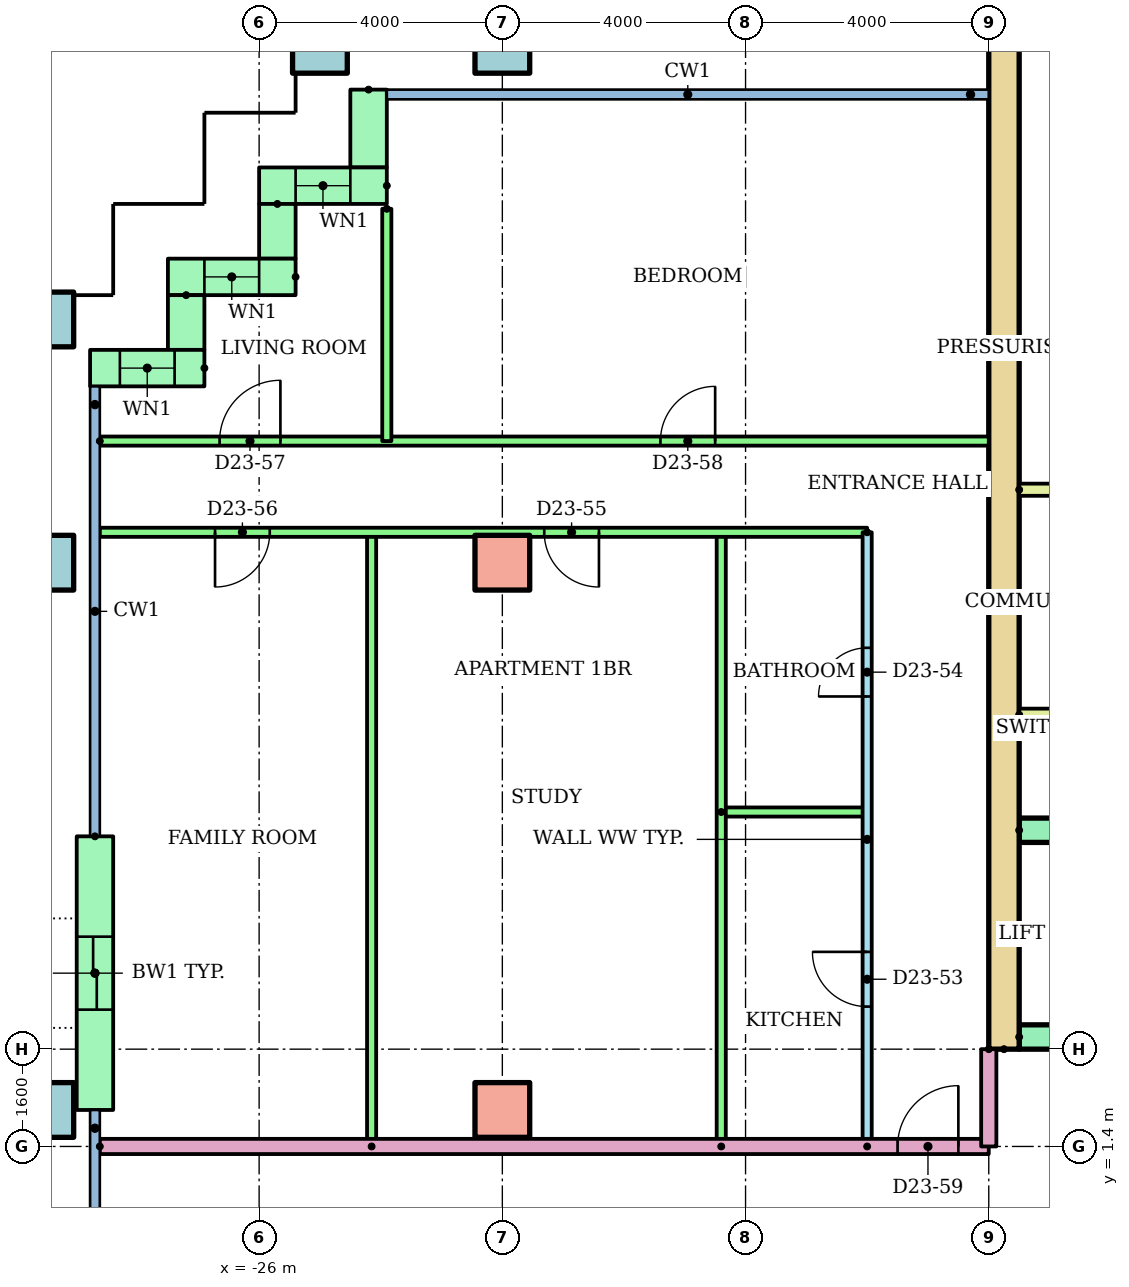
"""IFC4 building model, lengths in metres.
Left out: names, types, materials, properties, quantities, classifications, styles, units other than length and angle.
Written with IfcOpenShell. Run it as: python <this file> out.ifc"""

import sys

from ifc_helpers import new_model, si_unit, direction, frame, frame_2d, origin, origin_2d, place, context, subcontext, project, spatial, rectangle, hollow_rectangle, extrude, element, fill, save


model = new_model("IFC4")
c1 = context("Model", 3, precision=1e-05, world=origin(), true_north=direction((0.0, 1.0)))
c2 = subcontext(c1, "Body", "Model", "MODEL_VIEW")
j1 = project(units=[si_unit("LENGTHUNIT", "METRE"), si_unit("PLANEANGLEUNIT", "RADIAN")], contexts=[c1])
p1 = place(None, origin())
s1 = spatial("IfcSite", under=j1, at=p1, CompositionType="ELEMENT")
p2 = place(p1, origin())
s2 = spatial("IfcBuilding", under=s1, at=p2, CompositionType="ELEMENT")
p3 = place(p2, frame((0.0, 0.0, 90.3)))
s3 = spatial("IfcBuildingStorey", under=s2, at=p3, CompositionType="ELEMENT", Elevation=90.3)
p4 = place(p3, frame((-29.5, 2.0, 0.0)))
e1 = element("IfcColumn", 1, at=p4, inside=s3, PredefinedType="COLUMN", context=c2, shape_type="SweptSolid", body=[
    extrude(hollow_rectangle(XDim=0.9, YDim=0.9, WallThickness=0.045, at=origin_2d()), origin(), (0.0, 0.0, 1.0), 3.2),
])
p5 = place(p3, frame((-22.0, 2.0, 0.0)))
e2 = element("IfcColumn", 2, at=p5, inside=s3, PredefinedType="COLUMN", context=c2, shape_type="SweptSolid", body=[
    extrude(rectangle(XDim=0.9, YDim=0.9, at=origin_2d()), origin(), (0.0, 0.0, 1.0), 3.2),
])
p6 = place(p3, frame((-29.5, 11.0, 0.0)))
e3 = element("IfcColumn", 3, at=p6, inside=s3, PredefinedType="COLUMN", context=c2, shape_type="SweptSolid", body=[
    extrude(hollow_rectangle(XDim=0.9, YDim=0.9, WallThickness=0.045, at=origin_2d()), origin(), (0.0, 0.0, 1.0), 3.2),
])
p7 = place(p3, frame((-22.0, 11.0, 0.0)))
e4 = element("IfcColumn", 4, at=p7, inside=s3, PredefinedType="COLUMN", context=c2, shape_type="SweptSolid", body=[
    extrude(rectangle(XDim=0.9, YDim=0.9, at=origin_2d()), origin(), (0.0, 0.0, 1.0), 3.2),
])
for number, where in (
    (5, (-29.5, 15.0, 0.0)),
    (6, (-25.0, 19.5, 0.0)),
    (7, (-22.0, 19.5, 0.0)),
):
    element("IfcColumn", number, at=place(p3, frame(where)), inside=s3, PredefinedType="COLUMN", context=c2, shape_type="SweptSolid", body=[
        extrude(hollow_rectangle(XDim=0.9, YDim=0.9, WallThickness=0.045, at=origin_2d()), origin(), (0.0, 0.0, 1.0), 3.2),
    ])
p8 = place(p3, frame((-24.2, 18.78, 0.0), z_axis=(0.0, 0.0, 1.0), x_axis=(0.0, -1.0, 0.0)))
e8 = element("IfcWall", 8, at=p8, inside=s3, PredefinedType="STANDARD", context=c2, shape_type="SweptSolid", body=[
    extrude(rectangle(XDim=1.28, YDim=0.6, at=frame_2d((0.64, 0.0))), origin(), (0.0, 0.0, 1.0), 2.92),
])
p9 = place(p3, frame((-23.9, 17.2, 0.0), z_axis=(0.0, 0.0, 1.0), x_axis=(-1.0, 0.0, 0.0)))
e9 = element("IfcWall", 9, at=p9, inside=s3, PredefinedType="STANDARD", context=c2, shape_type="SweptSolid", body=[
    extrude(rectangle(XDim=2.1, YDim=0.6, at=frame_2d((1.05, 0.0))), origin(), (0.0, 0.0, 1.0), 2.92),
])
p10 = place(p9, frame((0.6, 0.0, 0.9)))
e10 = element("IfcOpeningElement", 10, at=p10, cuts=e9, PredefinedType="OPENING", context=c2, shape_type="SweptSolid", body=[
    extrude(rectangle(XDim=0.9, YDim=1.5, at=frame_2d((0.45, 0.75))), frame((0.0, 0.31, 0.0), z_axis=(0.0, -1.0, 0.0), x_axis=(1.0, 0.0, 0.0)), (0.0, 0.0, 1.0), 0.62),
])
p11 = place(p3, frame((-25.7, 16.9, 0.0), z_axis=(0.0, 0.0, 1.0), x_axis=(0.0, -1.0, 0.0)))
e11 = element("IfcWall", 11, at=p11, inside=s3, PredefinedType="STANDARD", context=c2, shape_type="SweptSolid", body=[
    extrude(rectangle(XDim=0.9, YDim=0.6, at=frame_2d((0.45, 0.0))), origin(), (0.0, 0.0, 1.0), 2.92),
])
p12 = place(p3, frame((-25.4, 15.7, 0.0), z_axis=(0.0, 0.0, 1.0), x_axis=(-1.0, 0.0, 0.0)))
e12 = element("IfcWall", 12, at=p12, inside=s3, PredefinedType="STANDARD", context=c2, shape_type="SweptSolid", body=[
    extrude(rectangle(XDim=2.1, YDim=0.6, at=frame_2d((1.05, 0.0))), origin(), (0.0, 0.0, 1.0), 2.92),
])
p13 = place(p12, frame((0.6, 0.0, 0.9)))
e13 = element("IfcOpeningElement", 13, at=p13, cuts=e12, PredefinedType="OPENING", context=c2, shape_type="SweptSolid", body=[
    extrude(rectangle(XDim=0.9, YDim=1.5, at=frame_2d((0.45, 0.75))), frame((0.0, 0.31, 0.0), z_axis=(0.0, -1.0, 0.0), x_axis=(1.0, 0.0, 0.0)), (0.0, 0.0, 1.0), 0.62),
])
p14 = place(p3, frame((-27.2, 15.4, 0.0), z_axis=(0.0, 0.0, 1.0), x_axis=(0.0, -1.0, 0.0)))
e14 = element("IfcWall", 14, at=p14, inside=s3, PredefinedType="STANDARD", context=c2, shape_type="SweptSolid", body=[
    extrude(rectangle(XDim=0.9, YDim=0.6, at=frame_2d((0.45, 0.0))), origin(), (0.0, 0.0, 1.0), 2.92),
])
p15 = place(p3, frame((-26.9, 14.2, 0.0), z_axis=(0.0, 0.0, 1.0), x_axis=(-1.0, 0.0, 0.0)))
e15 = element("IfcWall", 15, at=p15, inside=s3, PredefinedType="STANDARD", context=c2, shape_type="SweptSolid", body=[
    extrude(rectangle(XDim=1.88, YDim=0.6, at=frame_2d((0.94, 0.0))), origin(), (0.0, 0.0, 1.0), 2.92),
])
p16 = place(p15, frame((0.49, 0.0, 0.9)))
e16 = element("IfcOpeningElement", 16, at=p16, cuts=e15, PredefinedType="OPENING", context=c2, shape_type="SweptSolid", body=[
    extrude(rectangle(XDim=0.9, YDim=1.5, at=frame_2d((0.45, 0.75))), frame((0.0, 0.31, 0.0), z_axis=(0.0, -1.0, 0.0), x_axis=(1.0, 0.0, 0.0)), (0.0, 0.0, 1.0), 0.62),
])
p17 = place(p3, frame((-28.7, 6.5, 0.0), z_axis=(0.0, 0.0, 1.0), x_axis=(0.0, -1.0, 0.0)))
e17 = element("IfcWall", 17, at=p17, inside=s3, PredefinedType="STANDARD", context=c2, shape_type="SweptSolid", body=[
    extrude(rectangle(XDim=4.5, YDim=0.6, at=frame_2d((2.25, 0.0))), origin(), (0.0, 0.0, 1.0), 2.92),
])
p18 = place(p17, frame((1.65, 0.0, 0.0)))
e18 = element("IfcOpeningElement", 18, at=p18, cuts=e17, PredefinedType="OPENING", context=c2, shape_type="SweptSolid", body=[
    extrude(rectangle(XDim=1.2, YDim=2.1, at=frame_2d((0.6, 1.05))), frame((0.0, 0.31, 0.0), z_axis=(0.0, -1.0, 0.0), x_axis=(1.0, 0.0, 0.0)), (0.0, 0.0, 1.0), 0.62),
])
p19 = place(p3, frame((-13.75, 3.0, 0.0), z_axis=(0.0, 0.0, 1.0), x_axis=(0.0, 1.0, 0.0)))
e19 = element("IfcWall", 19, at=p19, inside=s3, PredefinedType="SHEAR", context=c2, shape_type="SweptSolid", body=[
    extrude(rectangle(XDim=17.0, YDim=0.5, at=frame_2d((8.5, 0.0))), origin(), (0.0, 0.0, 1.0), 2.92),
])
p20 = place(p3, frame((-13.5, 3.2, 0.0)))
e20 = element("IfcWall", 20, at=p20, inside=s3, PredefinedType="SHEAR", context=c2, shape_type="SweptSolid", body=[
    extrude(rectangle(XDim=27.0, YDim=0.4, at=frame_2d((13.5, 0.0))), origin(), (0.0, 0.0, 1.0), 2.92),
])
p21 = place(p20, frame((6.861, 0.0, 0.0)))
e21 = element("IfcOpeningElement", 21, at=p21, cuts=e20, PredefinedType="OPENING", context=c2, shape_type="SweptSolid", body=[
    extrude(rectangle(XDim=1.1, YDim=2.1, at=frame_2d((0.55, 1.05))), frame((0.0, 0.21, 0.0), z_axis=(0.0, -1.0, 0.0), x_axis=(1.0, 0.0, 0.0)), (0.0, 0.0, 1.0), 0.42),
])
p22 = place(p20, frame((9.906, 0.0, 0.0)))
e22 = element("IfcOpeningElement", 22, at=p22, cuts=e20, PredefinedType="OPENING", context=c2, shape_type="SweptSolid", body=[
    extrude(rectangle(XDim=1.1, YDim=2.1, at=frame_2d((0.55, 1.05))), frame((0.0, 0.21, 0.0), z_axis=(0.0, -1.0, 0.0), x_axis=(1.0, 0.0, 0.0)), (0.0, 0.0, 1.0), 0.42),
])
p23 = place(p20, frame((15.994, 0.0, 0.0)))
e23 = element("IfcOpeningElement", 23, at=p23, cuts=e20, PredefinedType="OPENING", context=c2, shape_type="SweptSolid", body=[
    extrude(rectangle(XDim=1.1, YDim=2.1, at=frame_2d((0.55, 1.05))), frame((0.0, 0.21, 0.0), z_axis=(0.0, -1.0, 0.0), x_axis=(1.0, 0.0, 0.0)), (0.0, 0.0, 1.0), 0.42),
])
p24 = place(p20, frame((19.039, 0.0, 0.0)))
e24 = element("IfcOpeningElement", 24, at=p24, cuts=e20, PredefinedType="OPENING", context=c2, shape_type="SweptSolid", body=[
    extrude(rectangle(XDim=1.1, YDim=2.1, at=frame_2d((0.55, 1.05))), frame((0.0, 0.21, 0.0), z_axis=(0.0, -1.0, 0.0), x_axis=(1.0, 0.0, 0.0)), (0.0, 0.0, 1.0), 0.42),
])
p25 = place(p20, frame((12.6, 0.0, 0.0)))
e25 = element("IfcOpeningElement", 25, at=p25, cuts=e20, PredefinedType="OPENING", context=c2, shape_type="SweptSolid", body=[
    extrude(rectangle(XDim=1.8, YDim=2.1, at=frame_2d((0.9, 1.05))), frame((0.0, 0.21, 0.0), z_axis=(0.0, -1.0, 0.0), x_axis=(1.0, 0.0, 0.0)), (0.0, 0.0, 1.0), 0.42),
])
p26 = place(p3, frame((-13.5, 6.6, 0.0)))
e26 = element("IfcWall", 26, at=p26, inside=s3, PredefinedType="SHEAR", context=c2, shape_type="SweptSolid", body=[
    extrude(rectangle(XDim=11.978, YDim=0.4, at=frame_2d((5.989, 0.0))), origin(), (0.0, 0.0, 1.0), 2.92),
])
for number, where in (
    (27, (-13.5, 8.5, 0.0)),
    (28, (-13.5, 12.2, 0.0)),
):
    element("IfcWall", number, at=place(p3, frame(where)), inside=s3, PredefinedType="PARTITIONING", context=c2, shape_type="SweptSolid", body=[
        extrude(rectangle(XDim=3.9, YDim=0.2, at=frame_2d((1.95, 0.0))), origin(), (0.0, 0.0, 1.0), 2.92),
    ])
p27 = place(p3, frame((-16.0, 1.4, 0.0), z_axis=(0.0, 0.0, 1.0), x_axis=(0.0, 1.0, 0.0)))
e29 = element("IfcWall", 29, at=p27, inside=s3, PredefinedType="PARTITIONING", context=c2, shape_type="SweptSolid", body=[
    extrude(rectangle(XDim=10.1, YDim=0.15, at=frame_2d((5.05, 0.0))), origin(), (0.0, 0.0, 1.0), 2.4),
])
p28 = place(p27, frame((2.3, 0.0, 0.0)))
e30 = element("IfcOpeningElement", 30, at=p28, cuts=e29, PredefinedType="OPENING", context=c2, shape_type="SweptSolid", body=[
    extrude(rectangle(XDim=0.9, YDim=2.1, at=frame_2d((0.45, 1.05))), frame((0.0, 0.085, 0.0), z_axis=(0.0, -1.0, 0.0), x_axis=(1.0, 0.0, 0.0)), (0.0, 0.0, 1.0), 0.17),
])
p29 = place(p27, frame((7.4, 0.0, 0.0)))
e31 = element("IfcOpeningElement", 31, at=p29, cuts=e29, PredefinedType="OPENING", context=c2, shape_type="SweptSolid", body=[
    extrude(rectangle(XDim=0.8, YDim=2.1, at=frame_2d((0.4, 1.05))), frame((0.0, 0.085, 0.0), z_axis=(0.0, -1.0, 0.0), x_axis=(1.0, 0.0, 0.0)), (0.0, 0.0, 1.0), 0.17),
])
p30 = place(p3, frame((-18.4, 6.9, 0.0)))
e32 = element("IfcWall", 32, at=p30, inside=s3, PredefinedType="PARTITIONING", context=c2, shape_type="SweptSolid", body=[
    extrude(rectangle(XDim=2.4, YDim=0.15, at=frame_2d((1.2, 0.0))), origin(), (0.0, 0.0, 1.0), 2.4),
])
for number, where, z_axis, x_axis in (
    (33, (-18.4, 1.4, 0.0), (0.0, 0.0, 1.0), (0.0, 1.0, 0.0)),
    (34, (-24.15, 1.4, 0.0), (0.0, 0.0, 1.0), (0.0, 1.0, 0.0)),
):
    element("IfcWall", number, at=place(p3, frame(where, z_axis=z_axis, x_axis=x_axis)), inside=s3, PredefinedType="PARTITIONING", context=c2, shape_type="SweptSolid", body=[
        extrude(rectangle(XDim=10.1, YDim=0.15, at=frame_2d((5.05, 0.0))), origin(), (0.0, 0.0, 1.0), 2.4),
    ])
p31 = place(p3, frame((-16.0, 11.5, 0.0), z_axis=(0.0, 0.0, 1.0), x_axis=(-1.0, 0.0, 0.0)))
e35 = element("IfcWall", 35, at=p31, inside=s3, PredefinedType="PARTITIONING", context=c2, shape_type="SweptSolid", body=[
    extrude(rectangle(XDim=12.62, YDim=0.15, at=frame_2d((6.31, 0.0))), origin(), (0.0, 0.0, 1.0), 2.4),
])
p32 = place(p31, frame((4.411, 0.0, 0.0)))
e36 = element("IfcOpeningElement", 36, at=p32, cuts=e35, PredefinedType="OPENING", context=c2, shape_type="SweptSolid", body=[
    extrude(rectangle(XDim=0.9, YDim=2.1, at=frame_2d((0.45, 1.05))), frame((0.0, 0.085, 0.0), z_axis=(0.0, -1.0, 0.0), x_axis=(1.0, 0.0, 0.0)), (0.0, 0.0, 1.0), 0.17),
])
p33 = place(p31, frame((9.825, 0.0, 0.0)))
e37 = element("IfcOpeningElement", 37, at=p33, cuts=e35, PredefinedType="OPENING", context=c2, shape_type="SweptSolid", body=[
    extrude(rectangle(XDim=0.9, YDim=2.1, at=frame_2d((0.45, 1.05))), frame((0.0, 0.085, 0.0), z_axis=(0.0, -1.0, 0.0), x_axis=(1.0, 0.0, 0.0)), (0.0, 0.0, 1.0), 0.17),
])
p34 = place(p3, frame((-28.62, 13.0, 0.0)))
e38 = element("IfcWall", 38, at=p34, inside=s3, PredefinedType="PARTITIONING", context=c2, shape_type="SweptSolid", body=[
    extrude(rectangle(XDim=14.62, YDim=0.15, at=frame_2d((7.31, 0.0))), origin(), (0.0, 0.0, 1.0), 2.4),
])
p35 = place(p34, frame((1.97, 0.0, 0.0)))
e39 = element("IfcOpeningElement", 39, at=p35, cuts=e38, PredefinedType="OPENING", context=c2, shape_type="SweptSolid", body=[
    extrude(rectangle(XDim=1.0, YDim=2.1, at=frame_2d((0.5, 1.05))), frame((0.0, 0.085, 0.0), z_axis=(0.0, -1.0, 0.0), x_axis=(1.0, 0.0, 0.0)), (0.0, 0.0, 1.0), 0.17),
])
p36 = place(p34, frame((9.22, 0.0, 0.0)))
e40 = element("IfcOpeningElement", 40, at=p36, cuts=e38, PredefinedType="OPENING", context=c2, shape_type="SweptSolid", body=[
    extrude(rectangle(XDim=0.9, YDim=2.1, at=frame_2d((0.45, 1.05))), frame((0.0, 0.085, 0.0), z_axis=(0.0, -1.0, 0.0), x_axis=(1.0, 0.0, 0.0)), (0.0, 0.0, 1.0), 0.17),
])
p37 = place(p3, frame((-23.9, 16.82, 0.0), z_axis=(0.0, 0.0, 1.0), x_axis=(0.0, -1.0, 0.0)))
e41 = element("IfcWall", 41, at=p37, inside=s3, PredefinedType="PARTITIONING", context=c2, shape_type="SweptSolid", body=[
    extrude(rectangle(XDim=3.82, YDim=0.15, at=frame_2d((1.91, 0.0))), origin(), (0.0, 0.0, 1.0), 2.4),
])
p38 = place(p3, frame((-28.62, 1.4, 0.0)))
e42 = element("IfcWall", 42, at=p38, inside=s3, PredefinedType="PARTITIONING", context=c2, shape_type="SweptSolid", body=[
    extrude(rectangle(XDim=14.62, YDim=0.25, at=frame_2d((7.31, 0.0))), origin(), (0.0, 0.0, 1.0), 2.4),
])
p39 = place(p38, frame((13.12, 0.0, 0.0)))
e43 = element("IfcOpeningElement", 43, at=p39, cuts=e42, PredefinedType="OPENING", context=c2, shape_type="SweptSolid", body=[
    extrude(rectangle(XDim=1.0, YDim=2.1, at=frame_2d((0.5, 1.05))), frame((0.0, 0.135, 0.0), z_axis=(0.0, -1.0, 0.0), x_axis=(1.0, 0.0, 0.0)), (0.0, 0.0, 1.0), 0.27),
])
p40 = place(p3, frame((-14.0, 3.0, 0.0), z_axis=(0.0, 0.0, 1.0), x_axis=(0.0, -1.0, 0.0)))
e44 = element("IfcWall", 44, at=p40, inside=s3, PredefinedType="PARTITIONING", context=c2, shape_type="SweptSolid", body=[
    extrude(rectangle(XDim=1.6, YDim=0.25, at=frame_2d((0.8, 0.0))), origin(), (0.0, 0.0, 1.0), 2.4),
])
p41 = place(p10, origin())
e45 = element("IfcWindow", 45, at=p41, inside=s3, PartitioningType="SINGLE_PANEL", PredefinedType="WINDOW", context=c2, shape_type="SweptSolid", body=[
    extrude(rectangle(XDim=0.9, YDim=1.5, at=frame_2d((0.45, 0.75))), frame((0.0, 0.03, 0.0), z_axis=(0.0, -1.0, 0.0), x_axis=(1.0, 0.0, 0.0)), (0.0, 0.0, 1.0), 0.06),
])
fill(e10, e45)
p42 = place(p13, origin())
e46 = element("IfcWindow", 46, at=p42, inside=s3, PartitioningType="SINGLE_PANEL", PredefinedType="WINDOW", context=c2, shape_type="SweptSolid", body=[
    extrude(rectangle(XDim=0.9, YDim=1.5, at=frame_2d((0.45, 0.75))), frame((0.0, 0.03, 0.0), z_axis=(0.0, -1.0, 0.0), x_axis=(1.0, 0.0, 0.0)), (0.0, 0.0, 1.0), 0.06),
])
fill(e13, e46)
p43 = place(p16, origin())
e47 = element("IfcWindow", 47, at=p43, inside=s3, PartitioningType="SINGLE_PANEL", PredefinedType="WINDOW", context=c2, shape_type="SweptSolid", body=[
    extrude(rectangle(XDim=0.9, YDim=1.5, at=frame_2d((0.45, 0.75))), frame((0.0, 0.03, 0.0), z_axis=(0.0, -1.0, 0.0), x_axis=(1.0, 0.0, 0.0)), (0.0, 0.0, 1.0), 0.06),
])
fill(e16, e47)
p44 = place(p28, origin())
e48 = element("IfcDoor", 48, at=p44, inside=s3, OperationType="SINGLE_SWING_RIGHT", PredefinedType="DOOR", context=c2, shape_type="SweptSolid", body=[
    extrude(rectangle(XDim=0.9, YDim=2.1, at=frame_2d((0.45, 1.05))), frame((0.0, 0.025, 0.0), z_axis=(0.0, -1.0, 0.0), x_axis=(1.0, 0.0, 0.0)), (0.0, 0.0, 1.0), 0.05),
])
fill(e30, e48)
p45 = place(p29, origin())
e49 = element("IfcDoor", 49, at=p45, inside=s3, OperationType="SINGLE_SWING_LEFT", PredefinedType="DOOR", context=c2, shape_type="SweptSolid", body=[
    extrude(rectangle(XDim=0.8, YDim=2.1, at=frame_2d((0.4, 1.05))), frame((0.0, 0.025, 0.0), z_axis=(0.0, -1.0, 0.0), x_axis=(1.0, 0.0, 0.0)), (0.0, 0.0, 1.0), 0.05),
])
fill(e31, e49)
p46 = place(p32, origin())
e50 = element("IfcDoor", 50, at=p46, inside=s3, OperationType="SINGLE_SWING_LEFT", PredefinedType="DOOR", context=c2, shape_type="SweptSolid", body=[
    extrude(rectangle(XDim=0.9, YDim=2.1, at=frame_2d((0.45, 1.05))), frame((0.0, 0.025, 0.0), z_axis=(0.0, -1.0, 0.0), x_axis=(1.0, 0.0, 0.0)), (0.0, 0.0, 1.0), 0.05),
])
fill(e36, e50)
p47 = place(p33, origin())
e51 = element("IfcDoor", 51, at=p47, inside=s3, OperationType="SINGLE_SWING_RIGHT", PredefinedType="DOOR", context=c2, shape_type="SweptSolid", body=[
    extrude(rectangle(XDim=0.9, YDim=2.1, at=frame_2d((0.45, 1.05))), frame((0.0, 0.025, 0.0), z_axis=(0.0, -1.0, 0.0), x_axis=(1.0, 0.0, 0.0)), (0.0, 0.0, 1.0), 0.05),
])
fill(e37, e51)
p48 = place(p35, origin())
e52 = element("IfcDoor", 52, at=p48, inside=s3, OperationType="SINGLE_SWING_RIGHT", PredefinedType="DOOR", context=c2, shape_type="SweptSolid", body=[
    extrude(rectangle(XDim=1.0, YDim=2.1, at=frame_2d((0.5, 1.05))), frame((0.0, 0.025, 0.0), z_axis=(0.0, -1.0, 0.0), x_axis=(1.0, 0.0, 0.0)), (0.0, 0.0, 1.0), 0.05),
])
fill(e39, e52)
p49 = place(p36, origin())
e53 = element("IfcDoor", 53, at=p49, inside=s3, OperationType="SINGLE_SWING_RIGHT", PredefinedType="DOOR", context=c2, shape_type="SweptSolid", body=[
    extrude(rectangle(XDim=0.9, YDim=2.1, at=frame_2d((0.45, 1.05))), frame((0.0, 0.025, 0.0), z_axis=(0.0, -1.0, 0.0), x_axis=(1.0, 0.0, 0.0)), (0.0, 0.0, 1.0), 0.05),
])
fill(e40, e53)
p50 = place(p39, origin())
e54 = element("IfcDoor", 54, at=p50, inside=s3, OperationType="SINGLE_SWING_RIGHT", PredefinedType="DOOR", context=c2, shape_type="SweptSolid", body=[
    extrude(rectangle(XDim=1.0, YDim=2.1, at=frame_2d((0.5, 1.05))), frame((0.0, 0.025, 0.0), z_axis=(0.0, -1.0, 0.0), x_axis=(1.0, 0.0, 0.0)), (0.0, 0.0, 1.0), 0.05),
])
fill(e43, e54)
p51 = place(p18, origin())
e55 = element("IfcDoor", 55, at=p51, inside=s3, OperationType="SLIDING_TO_LEFT", PredefinedType="DOOR", context=c2, shape_type="SweptSolid", body=[
    extrude(rectangle(XDim=1.2, YDim=2.1, at=frame_2d((0.6, 1.05))), frame((0.0, 0.025, 0.0), z_axis=(0.0, -1.0, 0.0), x_axis=(1.0, 0.0, 0.0)), (0.0, 0.0, 1.0), 0.05),
])
fill(e18, e55)
save(model, sys.argv[1])
